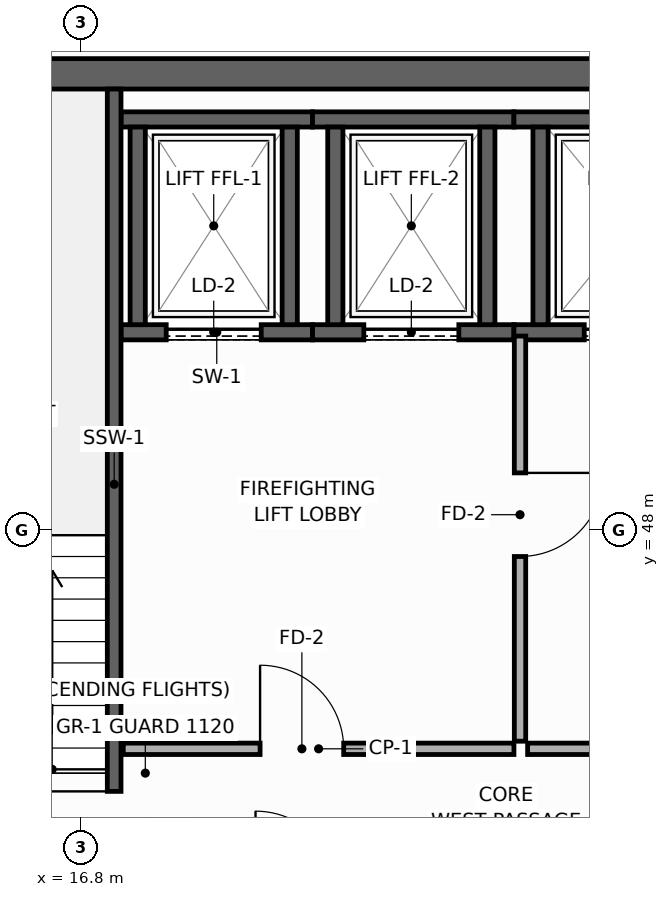
"""IFC4 building model, lengths in metres.
Left out: names, types, materials, properties, quantities, classifications, styles, units other than length and angle.
Written with IfcOpenShell. Run it as: python <this file> out.ifc"""

import sys

from ifc_helpers import new_model, si_unit, direction, frame, frame_2d, origin, place, context, subcontext, project, spatial, rectangle, extrude, element, fill, save


model = new_model("IFC4")
c1 = context("Model", 3, precision=1e-05, world=origin(), true_north=direction((0.0, 1.0)))
c2 = subcontext(c1, "Body", "Model", "MODEL_VIEW")
j1 = project(units=[si_unit("LENGTHUNIT", "METRE"), si_unit("PLANEANGLEUNIT", "RADIAN")], contexts=[c1])
p1 = place(None, origin())
s1 = spatial("IfcSite", under=j1, at=p1, CompositionType="ELEMENT")
p2 = place(p1, origin())
s2 = spatial("IfcBuilding", under=s1, at=p2, CompositionType="ELEMENT")
p3 = place(p2, frame((0.0, 0.0, 323.4)))
s3 = spatial("IfcBuildingStorey", under=s2, at=p3, CompositionType="ELEMENT", Elevation=323.4)
p4 = place(p3, frame((13.7, 54.0, 0.0), z_axis=(0.0, 0.0, 1.0), x_axis=(1.0, 0.0, 0.0)))
e1 = element("IfcWall", 1, at=p4, inside=s3, PredefinedType="SHEAR", context=c2, shape_type="SweptSolid", body=[
    extrude(rectangle(XDim=32.5, YDim=0.4, at=frame_2d((16.25, 0.0))), origin(), (0.0, 0.0, 1.0), 3.9),
])
p5 = place(p3, frame((17.33, 50.6, 0.0), z_axis=(0.0, 0.0, 1.0), x_axis=(1.0, 0.0, 0.0)))
e2 = element("IfcWall", 2, at=p5, inside=s3, PredefinedType="SHEAR", context=c2, shape_type="SweptSolid", body=[
    extrude(rectangle(XDim=2.52, YDim=0.2, at=frame_2d((1.26, 0.0))), origin(), (0.0, 0.0, 1.0), 3.68),
])
p6 = place(p5, frame((0.595, 0.0, 0.0)))
e3 = element("IfcOpeningElement", 3, at=p6, cuts=e2, PredefinedType="OPENING", context=c2, shape_type="SweptSolid", body=[
    extrude(rectangle(XDim=1.25, YDim=2.3, at=frame_2d((0.625, 1.15))), frame((0.0, 0.11, 0.0), z_axis=(0.0, -1.0, 0.0), x_axis=(1.0, 0.0, 0.0)), (0.0, 0.0, 1.0), 0.22),
])
p7 = place(p3, frame((17.33, 53.4, 0.0), z_axis=(0.0, 0.0, 1.0), x_axis=(1.0, 0.0, 0.0)))
e4 = element("IfcWall", 4, at=p7, inside=s3, PredefinedType="SHEAR", context=c2, shape_type="SweptSolid", body=[
    extrude(rectangle(XDim=2.52, YDim=0.2, at=frame_2d((1.26, 0.0))), origin(), (0.0, 0.0, 1.0), 3.68),
])
for number, where, z_axis, x_axis in (
    (5, (17.55, 50.7, 0.0), (0.0, 0.0, 1.0), (0.0, 1.0, 0.0)),
    (6, (19.55, 50.7, 0.0), (0.0, 0.0, 1.0), (0.0, 1.0, 0.0)),
):
    element("IfcWall", number, at=place(p3, frame(where, z_axis=z_axis, x_axis=x_axis)), inside=s3, PredefinedType="SHEAR", context=c2, shape_type="SweptSolid", body=[
        extrude(rectangle(XDim=2.6, YDim=0.2, at=frame_2d((1.3, 0.0))), origin(), (0.0, 0.0, 1.0), 3.68),
    ])
p8 = place(p3, frame((19.85, 50.6, 0.0), z_axis=(0.0, 0.0, 1.0), x_axis=(1.0, 0.0, 0.0)))
e7 = element("IfcWall", 7, at=p8, inside=s3, PredefinedType="SHEAR", context=c2, shape_type="SweptSolid", body=[
    extrude(rectangle(XDim=2.65, YDim=0.2, at=frame_2d((1.325, 0.0))), origin(), (0.0, 0.0, 1.0), 3.68),
])
p9 = place(p8, frame((0.675, 0.0, 0.0)))
e8 = element("IfcOpeningElement", 8, at=p9, cuts=e7, PredefinedType="OPENING", context=c2, shape_type="SweptSolid", body=[
    extrude(rectangle(XDim=1.25, YDim=2.3, at=frame_2d((0.625, 1.15))), frame((0.0, 0.11, 0.0), z_axis=(0.0, -1.0, 0.0), x_axis=(1.0, 0.0, 0.0)), (0.0, 0.0, 1.0), 0.22),
])
p10 = place(p3, frame((19.85, 53.4, 0.0), z_axis=(0.0, 0.0, 1.0), x_axis=(1.0, 0.0, 0.0)))
e9 = element("IfcWall", 9, at=p10, inside=s3, PredefinedType="SHEAR", context=c2, shape_type="SweptSolid", body=[
    extrude(rectangle(XDim=2.65, YDim=0.2, at=frame_2d((1.325, 0.0))), origin(), (0.0, 0.0, 1.0), 3.68),
])
for number, where, z_axis, x_axis in (
    (10, (20.15, 50.7, 0.0), (0.0, 0.0, 1.0), (0.0, 1.0, 0.0)),
    (11, (22.15, 50.7, 0.0), (0.0, 0.0, 1.0), (0.0, 1.0, 0.0)),
):
    element("IfcWall", number, at=place(p3, frame(where, z_axis=z_axis, x_axis=x_axis)), inside=s3, PredefinedType="SHEAR", context=c2, shape_type="SweptSolid", body=[
        extrude(rectangle(XDim=2.6, YDim=0.2, at=frame_2d((1.3, 0.0))), origin(), (0.0, 0.0, 1.0), 3.68),
    ])
p11 = place(p3, frame((22.5, 50.6, 0.0), z_axis=(0.0, 0.0, 1.0), x_axis=(1.0, 0.0, 0.0)))
e12 = element("IfcWall", 12, at=p11, inside=s3, PredefinedType="SHEAR", context=c2, shape_type="SweptSolid", body=[
    extrude(rectangle(XDim=2.85, YDim=0.2, at=frame_2d((1.425, 0.0))), origin(), (0.0, 0.0, 1.0), 3.68),
])
p12 = place(p11, frame((0.925, 0.0, 0.0)))
e13 = element("IfcOpeningElement", 13, at=p12, cuts=e12, PredefinedType="OPENING", context=c2, shape_type="SweptSolid", body=[
    extrude(rectangle(XDim=1.25, YDim=2.3, at=frame_2d((0.625, 1.15))), frame((0.0, 0.11, 0.0), z_axis=(0.0, -1.0, 0.0), x_axis=(1.0, 0.0, 0.0)), (0.0, 0.0, 1.0), 0.22),
])
p13 = place(p3, frame((22.5, 53.4, 0.0), z_axis=(0.0, 0.0, 1.0), x_axis=(1.0, 0.0, 0.0)))
e14 = element("IfcWall", 14, at=p13, inside=s3, PredefinedType="SHEAR", context=c2, shape_type="SweptSolid", body=[
    extrude(rectangle(XDim=2.85, YDim=0.2, at=frame_2d((1.425, 0.0))), origin(), (0.0, 0.0, 1.0), 3.68),
])
p14 = place(p3, frame((22.85, 50.7, 0.0), z_axis=(0.0, 0.0, 1.0), x_axis=(0.0, 1.0, 0.0)))
e15 = element("IfcWall", 15, at=p14, inside=s3, PredefinedType="SHEAR", context=c2, shape_type="SweptSolid", body=[
    extrude(rectangle(XDim=2.6, YDim=0.2, at=frame_2d((1.3, 0.0))), origin(), (0.0, 0.0, 1.0), 3.68),
])
p15 = place(p3, frame((17.24, 43.4, 0.0), z_axis=(0.0, 0.0, 1.0), x_axis=(0.0, 1.0, 0.0)))
e16 = element("IfcWall", 16, at=p15, inside=s3, PredefinedType="SHEAR", context=c2, shape_type="SweptSolid", body=[
    extrude(rectangle(XDim=10.4, YDim=0.18, at=frame_2d((5.2, 0.0))), origin(), (0.0, 0.0, 1.0), 3.9),
])
p16 = place(p15, frame((0.16, 0.0, 0.0)))
e17 = element("IfcOpeningElement", 17, at=p16, cuts=e16, PredefinedType="OPENING", context=c2, shape_type="SweptSolid", body=[
    extrude(rectangle(XDim=1.0, YDim=2.15, at=frame_2d((0.5, 1.075))), frame((0.0, 0.1, 0.0), z_axis=(0.0, -1.0, 0.0), x_axis=(1.0, 0.0, 0.0)), (0.0, 0.0, 1.0), 0.2),
])
p17 = place(p3, frame((17.36, 45.12, 0.0), z_axis=(0.0, 0.0, 1.0), x_axis=(1.0, 0.0, 0.0)))
e18 = element("IfcWall", 18, at=p17, inside=s3, PredefinedType="PARTITIONING", context=c2, shape_type="SweptSolid", body=[
    extrude(rectangle(XDim=5.14, YDim=0.15, at=frame_2d((2.57, 0.0))), origin(), (0.0, 0.0, 1.0), 3.9),
])
p18 = place(p17, frame((1.8, 0.0, 0.0)))
e19 = element("IfcOpeningElement", 19, at=p18, cuts=e18, PredefinedType="OPENING", context=c2, shape_type="SweptSolid", body=[
    extrude(rectangle(XDim=1.1, YDim=2.15, at=frame_2d((0.55, 1.075))), frame((0.0, 0.085, 0.0), z_axis=(0.0, -1.0, 0.0), x_axis=(1.0, 0.0, 0.0)), (0.0, 0.0, 1.0), 0.17),
])
p19 = place(p3, frame((22.58, 50.55, 0.0), z_axis=(0.0, 0.0, 1.0), x_axis=(0.0, -1.0, 0.0)))
e20 = element("IfcWall", 20, at=p19, inside=s3, PredefinedType="PARTITIONING", context=c2, shape_type="SweptSolid", body=[
    extrude(rectangle(XDim=5.33, YDim=0.15, at=frame_2d((2.665, 0.0))), origin(), (0.0, 0.0, 1.0), 3.9),
])
p20 = place(p19, frame((1.8, 0.0, 0.0)))
e21 = element("IfcOpeningElement", 21, at=p20, cuts=e20, PredefinedType="OPENING", context=c2, shape_type="SweptSolid", body=[
    extrude(rectangle(XDim=1.1, YDim=2.15, at=frame_2d((0.55, 1.075))), frame((0.0, 0.085, 0.0), z_axis=(0.0, -1.0, 0.0), x_axis=(1.0, 0.0, 0.0)), (0.0, 0.0, 1.0), 0.17),
])
p21 = place(p3, frame((22.68, 45.12, 0.0), z_axis=(0.0, 0.0, 1.0), x_axis=(1.0, 0.0, 0.0)))
e22 = element("IfcWall", 22, at=p21, inside=s3, PredefinedType="PARTITIONING", context=c2, shape_type="SweptSolid", body=[
    extrude(rectangle(XDim=2.92, YDim=0.15, at=frame_2d((1.46, 0.0))), origin(), (0.0, 0.0, 1.0), 3.9),
])
p22 = place(p21, frame((0.85, 0.0, 0.0)))
e23 = element("IfcOpeningElement", 23, at=p22, cuts=e22, PredefinedType="OPENING", context=c2, shape_type="SweptSolid", body=[
    extrude(rectangle(XDim=1.1, YDim=2.15, at=frame_2d((0.55, 1.075))), frame((0.0, 0.085, 0.0), z_axis=(0.0, -1.0, 0.0), x_axis=(1.0, 0.0, 0.0)), (0.0, 0.0, 1.0), 0.17),
])
p23 = place(p6, origin())
e24 = element("IfcDoor", 24, at=p23, inside=s3, OperationType="SLIDING_TO_LEFT", PredefinedType="DOOR", context=c2, shape_type="SweptSolid", body=[
    extrude(rectangle(XDim=1.25, YDim=2.3, at=frame_2d((0.625, 1.15))), frame((0.0, 0.025, 0.0), z_axis=(0.0, -1.0, 0.0), x_axis=(1.0, 0.0, 0.0)), (0.0, 0.0, 1.0), 0.05),
])
fill(e3, e24)
p24 = place(p9, origin())
e25 = element("IfcDoor", 25, at=p24, inside=s3, OperationType="SLIDING_TO_LEFT", PredefinedType="DOOR", context=c2, shape_type="SweptSolid", body=[
    extrude(rectangle(XDim=1.25, YDim=2.3, at=frame_2d((0.625, 1.15))), frame((0.0, 0.025, 0.0), z_axis=(0.0, -1.0, 0.0), x_axis=(1.0, 0.0, 0.0)), (0.0, 0.0, 1.0), 0.05),
])
fill(e8, e25)
p25 = place(p12, origin())
e26 = element("IfcDoor", 26, at=p25, inside=s3, OperationType="SLIDING_TO_LEFT", PredefinedType="DOOR", context=c2, shape_type="SweptSolid", body=[
    extrude(rectangle(XDim=1.25, YDim=2.3, at=frame_2d((0.625, 1.15))), frame((0.0, 0.025, 0.0), z_axis=(0.0, -1.0, 0.0), x_axis=(1.0, 0.0, 0.0)), (0.0, 0.0, 1.0), 0.05),
])
fill(e13, e26)
p26 = place(p16, origin())
e27 = element("IfcDoor", 27, at=p26, inside=s3, OperationType="SINGLE_SWING_RIGHT", PredefinedType="DOOR", context=c2, shape_type="SweptSolid", body=[
    extrude(rectangle(XDim=1.0, YDim=2.15, at=frame_2d((0.5, 1.075))), frame((0.0, 0.025, 0.0), z_axis=(0.0, -1.0, 0.0), x_axis=(1.0, 0.0, 0.0)), (0.0, 0.0, 1.0), 0.05),
])
fill(e17, e27)
p27 = place(p18, origin())
e28 = element("IfcDoor", 28, at=p27, inside=s3, OperationType="SINGLE_SWING_LEFT", PredefinedType="DOOR", context=c2, shape_type="SweptSolid", body=[
    extrude(rectangle(XDim=1.1, YDim=2.15, at=frame_2d((0.55, 1.075))), frame((0.0, 0.025, 0.0), z_axis=(0.0, -1.0, 0.0), x_axis=(1.0, 0.0, 0.0)), (0.0, 0.0, 1.0), 0.05),
])
fill(e19, e28)
p28 = place(p20, origin())
e29 = element("IfcDoor", 29, at=p28, inside=s3, OperationType="SINGLE_SWING_LEFT", PredefinedType="DOOR", context=c2, shape_type="SweptSolid", body=[
    extrude(rectangle(XDim=1.1, YDim=2.15, at=frame_2d((0.55, 1.075))), frame((0.0, 0.025, 0.0), z_axis=(0.0, -1.0, 0.0), x_axis=(1.0, 0.0, 0.0)), (0.0, 0.0, 1.0), 0.05),
])
fill(e21, e29)
save(model, sys.argv[1])
